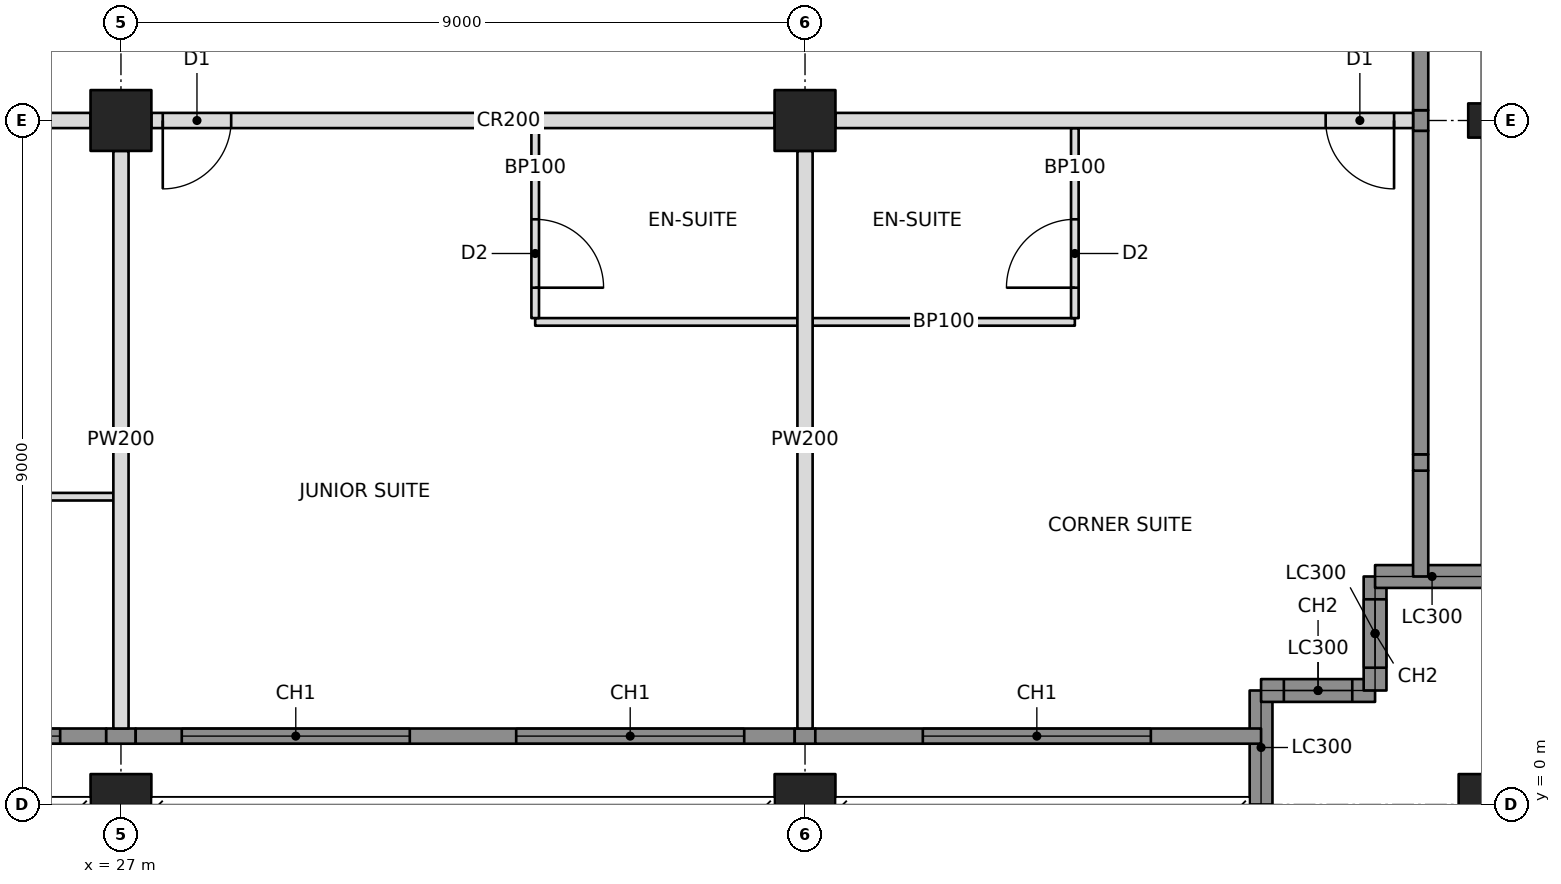
"""IFC4 building model, lengths in metres.
Left out: names, types, materials, properties, quantities, classifications, styles, units other than length and angle.
Written with IfcOpenShell. Run it as: python <this file> out.ifc"""

import sys

from ifc_helpers import new_model, si_unit, direction, frame, frame_2d, origin, origin_2d, place, context, subcontext, project, spatial, rectangle, hollow_rectangle, i_section, extrude, element, fill, save


model = new_model("IFC4")
c1 = context("Model", 3, precision=1e-05, world=origin(), true_north=direction((0.0, 1.0)))
c2 = subcontext(c1, "Body", "Model", "MODEL_VIEW")
j1 = project(units=[si_unit("LENGTHUNIT", "METRE"), si_unit("PLANEANGLEUNIT", "RADIAN")], contexts=[c1])
p1 = place(None, origin())
s1 = spatial("IfcSite", under=j1, at=p1, CompositionType="ELEMENT")
p2 = place(p1, origin())
s2 = spatial("IfcBuilding", under=s1, at=p2, CompositionType="ELEMENT")
p3 = place(p2, frame((0.0, 0.0, 180.8)))
s3 = spatial("IfcBuildingStorey", under=s2, at=p3, CompositionType="ELEMENT", Elevation=180.8)
p4 = place(p3, frame((27.0, 0.0, 0.0), z_axis=(0.0, 0.0, 1.0), x_axis=(1.0, 0.0, 0.0)))
e1 = element("IfcColumn", 1, at=p4, inside=s3, PredefinedType="COLUMN", context=c2, shape_type="SweptSolid", body=[
    extrude(hollow_rectangle(XDim=0.8, YDim=0.8, WallThickness=0.07, at=origin_2d()), origin(), (0.0, 0.0, 1.0), 3.4),
])
p5 = place(p3, frame((27.0, 9.0, 0.0), z_axis=(0.0, 0.0, 1.0), x_axis=(1.0, 0.0, 0.0)))
e2 = element("IfcColumn", 2, at=p5, inside=s3, PredefinedType="COLUMN", context=c2, shape_type="SweptSolid", body=[
    extrude(hollow_rectangle(XDim=0.8, YDim=0.8, WallThickness=0.06, at=origin_2d()), origin(), (0.0, 0.0, 1.0), 3.4),
])
p6 = place(p3, frame((36.0, 0.0, 0.0), z_axis=(0.0, 0.0, 1.0), x_axis=(1.0, 0.0, 0.0)))
e3 = element("IfcColumn", 3, at=p6, inside=s3, PredefinedType="COLUMN", context=c2, shape_type="SweptSolid", body=[
    extrude(hollow_rectangle(XDim=0.8, YDim=0.8, WallThickness=0.07, at=origin_2d()), origin(), (0.0, 0.0, 1.0), 3.4),
])
p7 = place(p3, frame((36.0, 9.0, 0.0), z_axis=(0.0, 0.0, 1.0), x_axis=(0.0, 1.0, 0.0)))
e4 = element("IfcColumn", 4, at=p7, inside=s3, PredefinedType="COLUMN", context=c2, shape_type="SweptSolid", body=[
    extrude(hollow_rectangle(XDim=0.8, YDim=0.8, WallThickness=0.06, at=origin_2d()), origin(), (0.0, 0.0, 1.0), 3.4),
])
p8 = place(p3, frame((45.0, 0.0, 0.0), z_axis=(0.0, 0.0, 1.0), x_axis=(1.0, 0.0, 0.0)))
e5 = element("IfcColumn", 5, at=p8, inside=s3, PredefinedType="COLUMN", context=c2, shape_type="SweptSolid", body=[
    extrude(hollow_rectangle(XDim=0.8, YDim=0.8, WallThickness=0.07, at=origin_2d()), origin(), (0.0, 0.0, 1.0), 3.4),
])
p9 = place(p3, frame((45.0, 9.0, 0.0), z_axis=(0.0, 0.0, 1.0), x_axis=(0.0, 1.0, 0.0)))
e6 = element("IfcColumn", 6, at=p9, inside=s3, PredefinedType="COLUMN", context=c2, shape_type="SweptSolid", body=[
    extrude(i_section(OverallWidth=0.449, OverallDepth=0.549, WebThickness=0.072, FlangeThickness=0.115, at=origin_2d()), origin(), (0.0, 0.0, 1.0), 3.4),
])
p10 = place(p3, frame((42.0, 0.0, 0.0), z_axis=(0.0, 0.0, 1.0), x_axis=(0.0, 1.0, 0.0)))
e7 = element("IfcWall", 7, at=p10, inside=s3, PredefinedType="SOLIDWALL", context=c2, shape_type="SweptSolid", body=[
    extrude(rectangle(XDim=1.5, YDim=0.3, at=frame_2d((0.75, 0.0))), origin(), (0.0, 0.0, 1.0), 2.42),
])
p11 = place(p3, frame((42.0, 1.5, 0.0), z_axis=(0.0, 0.0, 1.0), x_axis=(1.0, 0.0, 0.0)))
e8 = element("IfcWall", 8, at=p11, inside=s3, PredefinedType="SOLIDWALL", context=c2, shape_type="SweptSolid", body=[
    extrude(rectangle(XDim=1.5, YDim=0.3, at=frame_2d((0.75, 0.0))), origin(), (0.0, 0.0, 1.0), 3.2),
])
p12 = place(p11, frame((0.3, 0.0, 0.6)))
e9 = element("IfcOpeningElement", 9, at=p12, cuts=e8, PredefinedType="OPENING", context=c2, shape_type="SweptSolid", body=[
    extrude(rectangle(XDim=0.9, YDim=2.2, at=frame_2d((0.45, 1.1))), frame((0.0, 0.16, 0.0), z_axis=(0.0, -1.0, 0.0), x_axis=(1.0, 0.0, 0.0)), (0.0, 0.0, 1.0), 0.32),
])
p13 = place(p3, frame((43.5, 1.5, 0.0), z_axis=(0.0, 0.0, 1.0), x_axis=(0.0, 1.0, 0.0)))
e10 = element("IfcWall", 10, at=p13, inside=s3, PredefinedType="SOLIDWALL", context=c2, shape_type="SweptSolid", body=[
    extrude(rectangle(XDim=1.5, YDim=0.3, at=frame_2d((0.75, 0.0))), origin(), (0.0, 0.0, 1.0), 3.2),
])
p14 = place(p13, frame((0.3, 0.0, 0.6)))
e11 = element("IfcOpeningElement", 11, at=p14, cuts=e10, PredefinedType="OPENING", context=c2, shape_type="SweptSolid", body=[
    extrude(rectangle(XDim=0.9, YDim=2.2, at=frame_2d((0.45, 1.1))), frame((0.0, 0.16, 0.0), z_axis=(0.0, -1.0, 0.0), x_axis=(1.0, 0.0, 0.0)), (0.0, 0.0, 1.0), 0.32),
])
p15 = place(p3, frame((43.5, 3.0, 0.0), z_axis=(0.0, 0.0, 1.0), x_axis=(1.0, 0.0, 0.0)))
e12 = element("IfcWall", 12, at=p15, inside=s3, PredefinedType="SOLIDWALL", context=c2, shape_type="SweptSolid", body=[
    extrude(rectangle(XDim=1.5, YDim=0.3, at=frame_2d((0.75, 0.0))), origin(), (0.0, 0.0, 1.0), 2.42),
])
p16 = place(p3, frame((44.1, 3.0, 0.0), z_axis=(0.0, 0.0, 1.0), x_axis=(0.0, 1.0, 0.0)))
e13 = element("IfcWall", 13, at=p16, inside=s3, PredefinedType="SOLIDWALL", context=c2, shape_type="SweptSolid", body=[
    extrude(rectangle(XDim=1.393, YDim=0.2, at=frame_2d((0.696, 0.0))), origin(), (0.0, 0.0, 1.0), 3.2),
])
p17 = place(p3, frame((18.4, 9.0, 0.0), z_axis=(0.0, 0.0, 1.0), x_axis=(1.0, 0.0, 0.0)))
e14 = element("IfcWall", 14, at=p17, inside=s3, PredefinedType="PARTITIONING", context=c2, shape_type="SweptSolid", body=[
    extrude(rectangle(XDim=8.2, YDim=0.2, at=frame_2d((4.1, 0.0))), origin(), (0.0, 0.0, 1.0), 2.405),
])
p18 = place(p17, frame((0.15, 0.0, 0.0)))
e15 = element("IfcOpeningElement", 15, at=p18, cuts=e14, PredefinedType="OPENING", context=c2, shape_type="SweptSolid", body=[
    extrude(rectangle(XDim=0.9, YDim=2.1, at=frame_2d((0.45, 1.05))), frame((0.0, 0.11, 0.0), z_axis=(0.0, -1.0, 0.0), x_axis=(1.0, 0.0, 0.0)), (0.0, 0.0, 1.0), 0.22),
])
p19 = place(p3, frame((27.4, 9.0, 0.0), z_axis=(0.0, 0.0, 1.0), x_axis=(1.0, 0.0, 0.0)))
e16 = element("IfcWall", 16, at=p19, inside=s3, PredefinedType="PARTITIONING", context=c2, shape_type="SweptSolid", body=[
    extrude(rectangle(XDim=8.2, YDim=0.2, at=frame_2d((4.1, 0.0))), origin(), (0.0, 0.0, 1.0), 2.405),
])
p20 = place(p19, frame((0.15, 0.0, 0.0)))
e17 = element("IfcOpeningElement", 17, at=p20, cuts=e16, PredefinedType="OPENING", context=c2, shape_type="SweptSolid", body=[
    extrude(rectangle(XDim=0.9, YDim=2.1, at=frame_2d((0.45, 1.05))), frame((0.0, 0.11, 0.0), z_axis=(0.0, -1.0, 0.0), x_axis=(1.0, 0.0, 0.0)), (0.0, 0.0, 1.0), 0.22),
])
p21 = place(p3, frame((36.4, 9.0, 0.0), z_axis=(0.0, 0.0, 1.0), x_axis=(1.0, 0.0, 0.0)))
e18 = element("IfcWall", 18, at=p21, inside=s3, PredefinedType="PARTITIONING", context=c2, shape_type="SweptSolid", body=[
    extrude(rectangle(XDim=7.6, YDim=0.2, at=frame_2d((3.8, 0.0))), origin(), (0.0, 0.0, 1.0), 2.438),
])
p22 = place(p21, frame((6.45, 0.0, 0.0)))
e19 = element("IfcOpeningElement", 19, at=p22, cuts=e18, PredefinedType="OPENING", context=c2, shape_type="SweptSolid", body=[
    extrude(rectangle(XDim=0.9, YDim=2.1, at=frame_2d((0.45, 1.05))), frame((0.0, 0.11, 0.0), z_axis=(0.0, -1.0, 0.0), x_axis=(1.0, 0.0, 0.0)), (0.0, 0.0, 1.0), 0.22),
])
p23 = place(p3, frame((27.0, 8.6, 0.0), z_axis=(0.0, 0.0, 1.0), x_axis=(0.0, -1.0, 0.0)))
e20 = element("IfcWall", 20, at=p23, inside=s3, PredefinedType="PARTITIONING", context=c2, shape_type="SweptSolid", body=[
    extrude(rectangle(XDim=7.6, YDim=0.2, at=frame_2d((3.8, 0.0))), origin(), (0.0, 0.0, 1.0), 2.405),
])
p24 = place(p3, frame((36.0, 8.6, 0.0), z_axis=(0.0, 0.0, 1.0), x_axis=(0.0, -1.0, 0.0)))
e21 = element("IfcWall", 21, at=p24, inside=s3, PredefinedType="PARTITIONING", context=c2, shape_type="SweptSolid", body=[
    extrude(rectangle(XDim=7.6, YDim=0.2, at=frame_2d((3.8, 0.0))), origin(), (0.0, 0.0, 1.0), 2.438),
])
p25 = place(p3, frame((22.5, 4.05, 0.0), z_axis=(0.0, 0.0, 1.0), x_axis=(1.0, 0.0, 0.0)))
e22 = element("IfcWall", 22, at=p25, inside=s3, PredefinedType="PARTITIONING", context=c2, shape_type="SweptSolid", body=[
    extrude(rectangle(XDim=4.4, YDim=0.1, at=frame_2d((2.2, 0.0))), origin(), (0.0, 0.0, 1.0), 2.404),
])
p26 = place(p25, frame((0.5, 0.0, 0.0)))
e23 = element("IfcOpeningElement", 23, at=p26, cuts=e22, PredefinedType="OPENING", context=c2, shape_type="SweptSolid", body=[
    extrude(rectangle(XDim=0.9, YDim=2.1, at=frame_2d((0.45, 1.05))), frame((0.0, 0.06, 0.0), z_axis=(0.0, -1.0, 0.0), x_axis=(1.0, 0.0, 0.0)), (0.0, 0.0, 1.0), 0.12),
])
p27 = place(p3, frame((32.45, 6.35, 0.0), z_axis=(0.0, 0.0, 1.0), x_axis=(1.0, 0.0, 0.0)))
e24 = element("IfcWall", 24, at=p27, inside=s3, PredefinedType="PARTITIONING", context=c2, shape_type="SweptSolid", body=[
    extrude(rectangle(XDim=3.45, YDim=0.1, at=frame_2d((1.725, 0.0))), origin(), (0.0, 0.0, 1.0), 2.438),
])
p28 = place(p3, frame((32.45, 8.9, 0.0), z_axis=(0.0, 0.0, 1.0), x_axis=(0.0, -1.0, 0.0)))
e25 = element("IfcWall", 25, at=p28, inside=s3, PredefinedType="PARTITIONING", context=c2, shape_type="SweptSolid", body=[
    extrude(rectangle(XDim=2.5, YDim=0.1, at=frame_2d((1.25, 0.0))), origin(), (0.0, 0.0, 1.0), 2.404),
])
p29 = place(p28, frame((1.2, 0.0, 0.0)))
e26 = element("IfcOpeningElement", 26, at=p29, cuts=e25, PredefinedType="OPENING", context=c2, shape_type="SweptSolid", body=[
    extrude(rectangle(XDim=0.9, YDim=2.1, at=frame_2d((0.45, 1.05))), frame((0.0, 0.06, 0.0), z_axis=(0.0, -1.0, 0.0), x_axis=(1.0, 0.0, 0.0)), (0.0, 0.0, 1.0), 0.12),
])
p30 = place(p3, frame((36.1, 6.35, 0.0), z_axis=(0.0, 0.0, 1.0), x_axis=(1.0, 0.0, 0.0)))
e27 = element("IfcWall", 27, at=p30, inside=s3, PredefinedType="PARTITIONING", context=c2, shape_type="SweptSolid", body=[
    extrude(rectangle(XDim=3.45, YDim=0.1, at=frame_2d((1.725, 0.0))), origin(), (0.0, 0.0, 1.0), 2.438),
])
p31 = place(p3, frame((39.55, 8.9, 0.0), z_axis=(0.0, 0.0, 1.0), x_axis=(0.0, -1.0, 0.0)))
e28 = element("IfcWall", 28, at=p31, inside=s3, PredefinedType="PARTITIONING", context=c2, shape_type="SweptSolid", body=[
    extrude(rectangle(XDim=2.5, YDim=0.1, at=frame_2d((1.25, 0.0))), origin(), (0.0, 0.0, 1.0), 2.438),
])
p32 = place(p31, frame((1.2, 0.0, 0.0)))
e29 = element("IfcOpeningElement", 29, at=p32, cuts=e28, PredefinedType="OPENING", context=c2, shape_type="SweptSolid", body=[
    extrude(rectangle(XDim=0.9, YDim=2.1, at=frame_2d((0.45, 1.05))), frame((0.0, 0.06, 0.0), z_axis=(0.0, -1.0, 0.0), x_axis=(1.0, 0.0, 0.0)), (0.0, 0.0, 1.0), 0.12),
])
p33 = place(p3, frame((18.194, 0.9, 0.0), z_axis=(0.0, 0.0, 1.0), x_axis=(1.0, 0.0, 0.0)))
e30 = element("IfcWall", 30, at=p33, inside=s3, PredefinedType="SOLIDWALL", context=c2, shape_type="SweptSolid", body=[
    extrude(rectangle(XDim=8.612, YDim=0.2, at=frame_2d((4.306, 0.0))), origin(), (0.0, 0.0, 1.0), 3.2),
])
p34 = place(p33, frame((0.606, 0.0, 0.6)))
e31 = element("IfcOpeningElement", 31, at=p34, cuts=e30, PredefinedType="OPENING", context=c2, shape_type="SweptSolid", body=[
    extrude(rectangle(XDim=3.0, YDim=2.2, at=frame_2d((1.5, 1.1))), frame((0.0, 0.11, 0.0), z_axis=(0.0, -1.0, 0.0), x_axis=(1.0, 0.0, 0.0)), (0.0, 0.0, 1.0), 0.22),
])
p35 = place(p33, frame((5.006, 0.0, 0.6)))
e32 = element("IfcOpeningElement", 32, at=p35, cuts=e30, PredefinedType="OPENING", context=c2, shape_type="SweptSolid", body=[
    extrude(rectangle(XDim=3.0, YDim=2.2, at=frame_2d((1.5, 1.1))), frame((0.0, 0.11, 0.0), z_axis=(0.0, -1.0, 0.0), x_axis=(1.0, 0.0, 0.0)), (0.0, 0.0, 1.0), 0.22),
])
p36 = place(p3, frame((26.806, 0.9, 0.0), z_axis=(0.0, 0.0, 1.0), x_axis=(1.0, 0.0, 0.0)))
e33 = element("IfcWall", 33, at=p36, inside=s3, PredefinedType="SOLIDWALL", context=c2, shape_type="SweptSolid", body=[
    extrude(rectangle(XDim=0.388, YDim=0.2, at=frame_2d((0.194, 0.0))), origin(), (0.0, 0.0, 1.0), 2.404),
])
p37 = place(p3, frame((27.194, 0.9, 0.0), z_axis=(0.0, 0.0, 1.0), x_axis=(1.0, 0.0, 0.0)))
e34 = element("IfcWall", 34, at=p37, inside=s3, PredefinedType="SOLIDWALL", context=c2, shape_type="SweptSolid", body=[
    extrude(rectangle(XDim=8.671, YDim=0.2, at=frame_2d((4.335, 0.0))), origin(), (0.0, 0.0, 1.0), 3.2),
])
p38 = place(p37, frame((0.606, 0.0, 0.6)))
e35 = element("IfcOpeningElement", 35, at=p38, cuts=e34, PredefinedType="OPENING", context=c2, shape_type="SweptSolid", body=[
    extrude(rectangle(XDim=3.0, YDim=2.2, at=frame_2d((1.5, 1.1))), frame((0.0, 0.11, 0.0), z_axis=(0.0, -1.0, 0.0), x_axis=(1.0, 0.0, 0.0)), (0.0, 0.0, 1.0), 0.22),
])
p39 = place(p37, frame((5.006, 0.0, 0.6)))
e36 = element("IfcOpeningElement", 36, at=p39, cuts=e34, PredefinedType="OPENING", context=c2, shape_type="SweptSolid", body=[
    extrude(rectangle(XDim=3.0, YDim=2.2, at=frame_2d((1.5, 1.1))), frame((0.0, 0.11, 0.0), z_axis=(0.0, -1.0, 0.0), x_axis=(1.0, 0.0, 0.0)), (0.0, 0.0, 1.0), 0.22),
])
p40 = place(p3, frame((35.865, 0.9, 0.0), z_axis=(0.0, 0.0, 1.0), x_axis=(1.0, 0.0, 0.0)))
e37 = element("IfcWall", 37, at=p40, inside=s3, PredefinedType="SOLIDWALL", context=c2, shape_type="SweptSolid", body=[
    extrude(rectangle(XDim=0.271, YDim=0.2, at=frame_2d((0.135, 0.0))), origin(), (0.0, 0.0, 1.0), 2.438),
])
p41 = place(p3, frame((36.135, 0.9, 0.0), z_axis=(0.0, 0.0, 1.0), x_axis=(1.0, 0.0, 0.0)))
e38 = element("IfcWall", 38, at=p41, inside=s3, PredefinedType="SOLIDWALL", context=c2, shape_type="SweptSolid", body=[
    extrude(rectangle(XDim=5.865, YDim=0.2, at=frame_2d((2.932, 0.0))), origin(), (0.0, 0.0, 1.0), 3.2),
])
p42 = place(p41, frame((1.415, 0.0, 0.6)))
e39 = element("IfcOpeningElement", 39, at=p42, cuts=e38, PredefinedType="OPENING", context=c2, shape_type="SweptSolid", body=[
    extrude(rectangle(XDim=3.0, YDim=2.2, at=frame_2d((1.5, 1.1))), frame((0.0, 0.11, 0.0), z_axis=(0.0, -1.0, 0.0), x_axis=(1.0, 0.0, 0.0)), (0.0, 0.0, 1.0), 0.22),
])
p43 = place(p3, frame((44.1, 4.393, 0.0), z_axis=(0.0, 0.0, 1.0), x_axis=(0.0, 1.0, 0.0)))
e40 = element("IfcWall", 40, at=p43, inside=s3, PredefinedType="SOLIDWALL", context=c2, shape_type="SweptSolid", body=[
    extrude(rectangle(XDim=0.215, YDim=0.2, at=frame_2d((0.107, 0.0))), origin(), (0.0, 0.0, 1.0), 2.661),
])
p44 = place(p3, frame((44.1, 4.607, 0.0), z_axis=(0.0, 0.0, 1.0), x_axis=(0.0, 1.0, 0.0)))
e41 = element("IfcWall", 41, at=p44, inside=s3, PredefinedType="SOLIDWALL", context=c2, shape_type="SweptSolid", body=[
    extrude(rectangle(XDim=4.257, YDim=0.2, at=frame_2d((2.129, 0.0))), origin(), (0.0, 0.0, 1.0), 3.2),
])
p45 = place(p3, frame((44.1, 8.865, 0.0), z_axis=(0.0, 0.0, 1.0), x_axis=(0.0, 1.0, 0.0)))
e42 = element("IfcWall", 42, at=p45, inside=s3, PredefinedType="SOLIDWALL", context=c2, shape_type="SweptSolid", body=[
    extrude(rectangle(XDim=0.271, YDim=0.2, at=frame_2d((0.135, 0.0))), origin(), (0.0, 0.0, 1.0), 2.438),
])
p46 = place(p3, frame((44.1, 9.135, 0.0), z_axis=(0.0, 0.0, 1.0), x_axis=(0.0, 1.0, 0.0)))
e43 = element("IfcWall", 43, at=p46, inside=s3, PredefinedType="SOLIDWALL", context=c2, shape_type="SweptSolid", body=[
    extrude(rectangle(XDim=8.671, YDim=0.2, at=frame_2d((4.335, 0.0))), origin(), (0.0, 0.0, 1.0), 3.2),
])
p47 = place(p46, frame((2.015, 0.0, 0.6)))
e44 = element("IfcOpeningElement", 44, at=p47, cuts=e43, PredefinedType="OPENING", context=c2, shape_type="SweptSolid", body=[
    extrude(rectangle(XDim=3.0, YDim=2.2, at=frame_2d((1.5, 1.1))), frame((0.0, 0.11, 0.0), z_axis=(0.0, -1.0, 0.0), x_axis=(1.0, 0.0, 0.0)), (0.0, 0.0, 1.0), 0.22),
])
p48 = place(p46, frame((5.515, 0.0, 0.6)))
e45 = element("IfcOpeningElement", 45, at=p48, cuts=e43, PredefinedType="OPENING", context=c2, shape_type="SweptSolid", body=[
    extrude(rectangle(XDim=3.0, YDim=2.2, at=frame_2d((1.5, 1.1))), frame((0.0, 0.11, 0.0), z_axis=(0.0, -1.0, 0.0), x_axis=(1.0, 0.0, 0.0)), (0.0, 0.0, 1.0), 0.22),
])
p49 = place(p12, origin())
e46 = element("IfcWindow", 46, at=p49, inside=s3, PartitioningType="SINGLE_PANEL", PredefinedType="WINDOW", context=c2, shape_type="SweptSolid", body=[
    extrude(rectangle(XDim=0.9, YDim=2.2, at=frame_2d((0.45, 1.1))), frame((0.0, 0.03, 0.0), z_axis=(0.0, -1.0, 0.0), x_axis=(1.0, 0.0, 0.0)), (0.0, 0.0, 1.0), 0.06),
])
fill(e9, e46)
p50 = place(p14, origin())
e47 = element("IfcWindow", 47, at=p50, inside=s3, PartitioningType="SINGLE_PANEL", PredefinedType="WINDOW", context=c2, shape_type="SweptSolid", body=[
    extrude(rectangle(XDim=0.9, YDim=2.2, at=frame_2d((0.45, 1.1))), frame((0.0, 0.03, 0.0), z_axis=(0.0, -1.0, 0.0), x_axis=(1.0, 0.0, 0.0)), (0.0, 0.0, 1.0), 0.06),
])
fill(e11, e47)
p51 = place(p35, origin())
e48 = element("IfcWindow", 48, at=p51, inside=s3, PartitioningType="TRIPLE_PANEL_VERTICAL", PredefinedType="WINDOW", context=c2, shape_type="SweptSolid", body=[
    extrude(rectangle(XDim=3.0, YDim=2.2, at=frame_2d((1.5, 1.1))), frame((0.0, 0.03, 0.0), z_axis=(0.0, -1.0, 0.0), x_axis=(1.0, 0.0, 0.0)), (0.0, 0.0, 1.0), 0.06),
])
fill(e32, e48)
p52 = place(p38, origin())
e49 = element("IfcWindow", 49, at=p52, inside=s3, PartitioningType="TRIPLE_PANEL_VERTICAL", PredefinedType="WINDOW", context=c2, shape_type="SweptSolid", body=[
    extrude(rectangle(XDim=3.0, YDim=2.2, at=frame_2d((1.5, 1.1))), frame((0.0, 0.03, 0.0), z_axis=(0.0, -1.0, 0.0), x_axis=(1.0, 0.0, 0.0)), (0.0, 0.0, 1.0), 0.06),
])
fill(e35, e49)
p53 = place(p39, origin())
e50 = element("IfcWindow", 50, at=p53, inside=s3, PartitioningType="TRIPLE_PANEL_VERTICAL", PredefinedType="WINDOW", context=c2, shape_type="SweptSolid", body=[
    extrude(rectangle(XDim=3.0, YDim=2.2, at=frame_2d((1.5, 1.1))), frame((0.0, 0.03, 0.0), z_axis=(0.0, -1.0, 0.0), x_axis=(1.0, 0.0, 0.0)), (0.0, 0.0, 1.0), 0.06),
])
fill(e36, e50)
p54 = place(p42, origin())
e51 = element("IfcWindow", 51, at=p54, inside=s3, PartitioningType="TRIPLE_PANEL_VERTICAL", PredefinedType="WINDOW", context=c2, shape_type="SweptSolid", body=[
    extrude(rectangle(XDim=3.0, YDim=2.2, at=frame_2d((1.5, 1.1))), frame((0.0, 0.03, 0.0), z_axis=(0.0, -1.0, 0.0), x_axis=(1.0, 0.0, 0.0)), (0.0, 0.0, 1.0), 0.06),
])
fill(e39, e51)
p55 = place(p29, origin())
e52 = element("IfcDoor", 52, at=p55, inside=s3, OperationType="SINGLE_SWING_RIGHT", PredefinedType="DOOR", context=c2, shape_type="SweptSolid", body=[
    extrude(rectangle(XDim=0.9, YDim=2.1, at=frame_2d((0.45, 1.05))), frame((0.0, 0.025, 0.0), z_axis=(0.0, -1.0, 0.0), x_axis=(1.0, 0.0, 0.0)), (0.0, 0.0, 1.0), 0.05),
])
fill(e26, e52)
p56 = place(p20, frame((0.9, 0.0, 0.0), z_axis=(0.0, 0.0, 1.0), x_axis=(-1.0, 0.0, 0.0)))
e53 = element("IfcDoor", 53, at=p56, inside=s3, OperationType="SINGLE_SWING_RIGHT", PredefinedType="DOOR", context=c2, shape_type="SweptSolid", body=[
    extrude(rectangle(XDim=0.9, YDim=2.1, at=frame_2d((0.45, 1.05))), frame((0.0, 0.025, 0.0), z_axis=(0.0, -1.0, 0.0), x_axis=(1.0, 0.0, 0.0)), (0.0, 0.0, 1.0), 0.05),
])
fill(e17, e53)
p57 = place(p32, frame((0.9, 0.0, 0.0), z_axis=(0.0, 0.0, 1.0), x_axis=(-1.0, 0.0, 0.0)))
e54 = element("IfcDoor", 54, at=p57, inside=s3, OperationType="SINGLE_SWING_LEFT", PredefinedType="DOOR", context=c2, shape_type="SweptSolid", body=[
    extrude(rectangle(XDim=0.9, YDim=2.1, at=frame_2d((0.45, 1.05))), frame((0.0, 0.025, 0.0), z_axis=(0.0, -1.0, 0.0), x_axis=(1.0, 0.0, 0.0)), (0.0, 0.0, 1.0), 0.05),
])
fill(e29, e54)
p58 = place(p22, frame((0.9, 0.0, 0.0), z_axis=(0.0, 0.0, 1.0), x_axis=(-1.0, 0.0, 0.0)))
e55 = element("IfcDoor", 55, at=p58, inside=s3, OperationType="SINGLE_SWING_LEFT", PredefinedType="DOOR", context=c2, shape_type="SweptSolid", body=[
    extrude(rectangle(XDim=0.9, YDim=2.1, at=frame_2d((0.45, 1.05))), frame((0.0, 0.025, 0.0), z_axis=(0.0, -1.0, 0.0), x_axis=(1.0, 0.0, 0.0)), (0.0, 0.0, 1.0), 0.05),
])
fill(e19, e55)
save(model, sys.argv[1])
